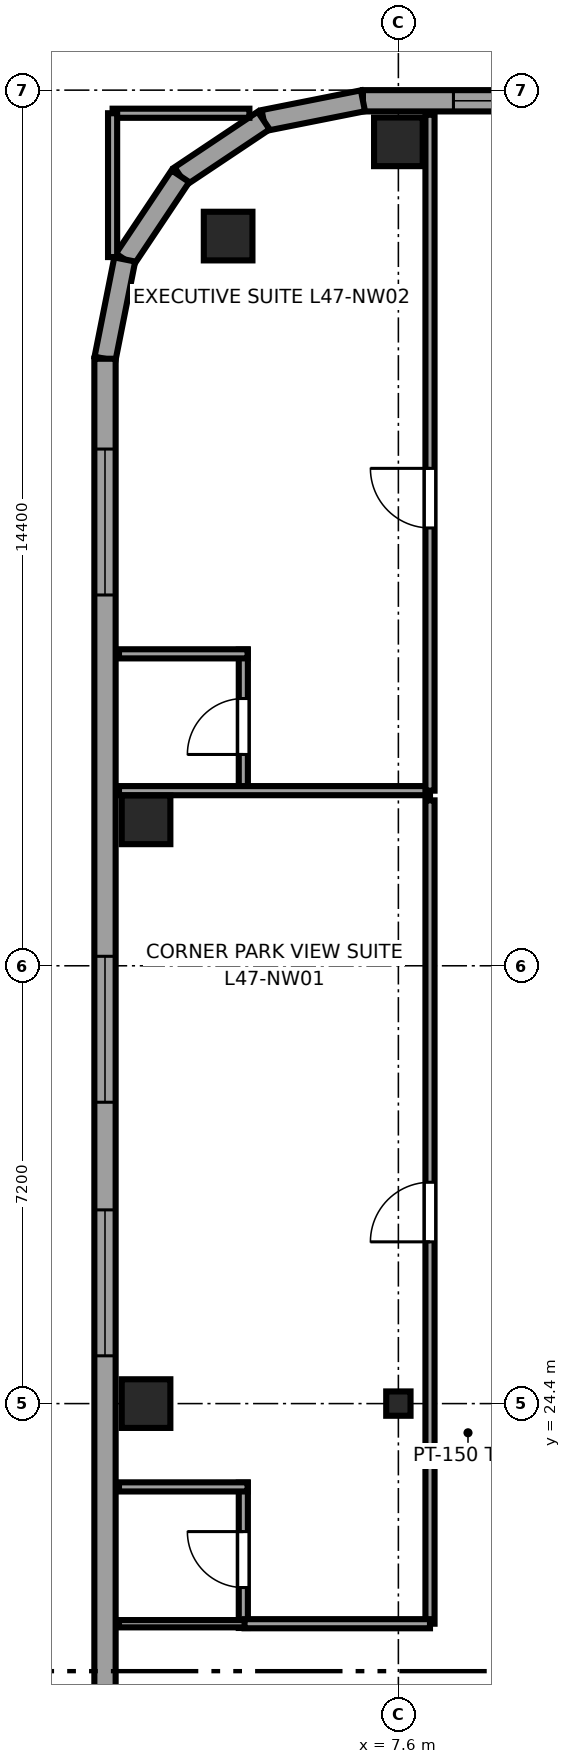
"""IFC4 building model, lengths in metres.
Left out: names, types, materials, properties, quantities, classifications, styles, units other than length and angle.
Written with IfcOpenShell. Run it as: python <this file> out.ifc"""

import sys

from ifc_helpers import new_model, si_unit, direction, frame, frame_2d, origin, origin_2d, place, context, subcontext, project, spatial, rectangle, i_section, extrude, source, transform, mapped, element, fill, save


model = new_model("IFC4")
c1 = context("Model", 3, precision=1e-05, world=origin(), true_north=direction((0.0, 1.0)))
c2 = subcontext(c1, "Body", "Model", "MODEL_VIEW")
j1 = project(units=[si_unit("LENGTHUNIT", "METRE"), si_unit("PLANEANGLEUNIT", "RADIAN")], contexts=[c1])
p1 = place(None, origin())
s1 = spatial("IfcSite", under=j1, at=p1, CompositionType="ELEMENT")
p2 = place(p1, origin())
s2 = spatial("IfcBuilding", under=s1, at=p2, CompositionType="ELEMENT")
p3 = place(p2, frame((0.0, 0.0, 179.0)))
s3 = spatial("IfcBuildingStorey", under=s2, at=p3, CompositionType="ELEMENT", Elevation=179.0)
m1 = source(origin(), c2, "Body", "SweptSolid", [
    extrude(rectangle(XDim=0.8, YDim=0.8, at=origin_2d()), origin(), (0.0, 0.0, 1.0), 3.55),
])
p4 = place(p3, frame((3.45, 24.4, 0.0), z_axis=(0.0, 0.0, 1.0), x_axis=(1.0, 0.0, 0.0)))
e1 = element("IfcColumn", 1, at=p4, inside=s3, PredefinedType="COLUMN", context=c2, shape_type="MappedRepresentation", body=[
    mapped(m1, transform((0.0, 0.0, 0.0), x_axis=(1.0, 0.0, 0.0), y_axis=(0.0, 1.0, 0.0), z_axis=(0.0, 0.0, 1.0), scale=1.0)),
])
m2 = source(origin(), c2, "Body", "SweptSolid", [
    extrude(i_section(OverallWidth=0.4, OverallDepth=0.4, WebThickness=0.02, FlangeThickness=0.035, at=origin_2d()), origin(), (0.0, 0.0, 1.0), 3.55),
])
p5 = place(p3, frame((7.6, 24.4, 0.0), z_axis=(0.0, 0.0, 1.0), x_axis=(1.0, 0.0, 0.0)))
e2 = element("IfcColumn", 2, at=p5, inside=s3, PredefinedType="COLUMN", context=c2, shape_type="MappedRepresentation", body=[
    mapped(m2, transform((0.0, 0.0, 0.0), x_axis=(1.0, 0.0, 0.0), y_axis=(0.0, 1.0, 0.0), z_axis=(0.0, 0.0, 1.0), scale=1.0)),
])
for number, where, z_axis, x_axis in (
    (3, (4.8, 43.6, 0.0), (0.0, 0.0, 1.0), (1.0, 0.0, 0.0)),
    (4, (7.6, 45.15, 0.0), (0.0, 0.0, 1.0), (1.0, 0.0, 0.0)),
    (5, (3.45, 34.0, 0.0), (0.0, 0.0, 1.0), (1.0, 0.0, 0.0)),
):
    element("IfcColumn", number, at=place(p3, frame(where, z_axis=z_axis, x_axis=x_axis)), inside=s3, PredefinedType="COLUMN", context=c2, shape_type="MappedRepresentation", body=[
        mapped(m1, transform((0.0, 0.0, 0.0), x_axis=(1.0, 0.0, 0.0), y_axis=(0.0, 1.0, 0.0), z_axis=(0.0, 0.0, 1.0), scale=1.0)),
    ])
p6 = place(p3, frame((49.983, 45.825, 0.0), z_axis=(0.0, 0.0, 1.0), x_axis=(-1.0, 0.0, 0.0)))
e6 = element("IfcWall", 6, at=p6, inside=s3, PredefinedType="SOLIDWALL", context=c2, shape_type="SweptSolid", body=[
    extrude(rectangle(XDim=42.966, YDim=0.35, at=frame_2d((21.483, 0.0))), origin(), (0.0, 0.0, 1.0), 3.25),
])
p7 = place(p6, frame((1.488, 0.0, 0.68)))
e7 = element("IfcOpeningElement", 7, at=p7, cuts=e6, PredefinedType="OPENING", context=c2, shape_type="SweptSolid", body=[
    extrude(rectangle(XDim=2.4, YDim=1.9, at=frame_2d((1.2, 0.95))), frame((0.0, 0.185, 0.0), z_axis=(0.0, -1.0, 0.0), x_axis=(1.0, 0.0, 0.0)), (0.0, 0.0, 1.0), 0.37),
])
p8 = place(p6, frame((9.841, 0.0, 0.68)))
e8 = element("IfcOpeningElement", 8, at=p8, cuts=e6, PredefinedType="OPENING", context=c2, shape_type="SweptSolid", body=[
    extrude(rectangle(XDim=2.4, YDim=1.9, at=frame_2d((1.2, 0.95))), frame((0.0, 0.185, 0.0), z_axis=(0.0, -1.0, 0.0), x_axis=(1.0, 0.0, 0.0)), (0.0, 0.0, 1.0), 0.37),
])
p9 = place(p6, frame((14.018, 0.0, 0.68)))
e9 = element("IfcOpeningElement", 9, at=p9, cuts=e6, PredefinedType="OPENING", context=c2, shape_type="SweptSolid", body=[
    extrude(rectangle(XDim=2.4, YDim=1.9, at=frame_2d((1.2, 0.95))), frame((0.0, 0.185, 0.0), z_axis=(0.0, -1.0, 0.0), x_axis=(1.0, 0.0, 0.0)), (0.0, 0.0, 1.0), 0.37),
])
p10 = place(p6, frame((18.195, 0.0, 0.68)))
e10 = element("IfcOpeningElement", 10, at=p10, cuts=e6, PredefinedType="OPENING", context=c2, shape_type="SweptSolid", body=[
    extrude(rectangle(XDim=2.4, YDim=1.9, at=frame_2d((1.2, 0.95))), frame((0.0, 0.185, 0.0), z_axis=(0.0, -1.0, 0.0), x_axis=(1.0, 0.0, 0.0)), (0.0, 0.0, 1.0), 0.37),
])
p11 = place(p6, frame((22.371, 0.0, 0.68)))
e11 = element("IfcOpeningElement", 11, at=p11, cuts=e6, PredefinedType="OPENING", context=c2, shape_type="SweptSolid", body=[
    extrude(rectangle(XDim=2.4, YDim=1.9, at=frame_2d((1.2, 0.95))), frame((0.0, 0.185, 0.0), z_axis=(0.0, -1.0, 0.0), x_axis=(1.0, 0.0, 0.0)), (0.0, 0.0, 1.0), 0.37),
])
p12 = place(p6, frame((26.548, 0.0, 0.68)))
e12 = element("IfcOpeningElement", 12, at=p12, cuts=e6, PredefinedType="OPENING", context=c2, shape_type="SweptSolid", body=[
    extrude(rectangle(XDim=2.4, YDim=1.9, at=frame_2d((1.2, 0.95))), frame((0.0, 0.185, 0.0), z_axis=(0.0, -1.0, 0.0), x_axis=(1.0, 0.0, 0.0)), (0.0, 0.0, 1.0), 0.37),
])
p13 = place(p6, frame((30.724, 0.0, 0.68)))
e13 = element("IfcOpeningElement", 13, at=p13, cuts=e6, PredefinedType="OPENING", context=c2, shape_type="SweptSolid", body=[
    extrude(rectangle(XDim=2.4, YDim=1.9, at=frame_2d((1.2, 0.95))), frame((0.0, 0.185, 0.0), z_axis=(0.0, -1.0, 0.0), x_axis=(1.0, 0.0, 0.0)), (0.0, 0.0, 1.0), 0.37),
])
p14 = place(p6, frame((34.901, 0.0, 0.68)))
e14 = element("IfcOpeningElement", 14, at=p14, cuts=e6, PredefinedType="OPENING", context=c2, shape_type="SweptSolid", body=[
    extrude(rectangle(XDim=2.4, YDim=1.9, at=frame_2d((1.2, 0.95))), frame((0.0, 0.185, 0.0), z_axis=(0.0, -1.0, 0.0), x_axis=(1.0, 0.0, 0.0)), (0.0, 0.0, 1.0), 0.37),
])
p15 = place(p6, frame((39.077, 0.0, 0.68)))
e15 = element("IfcOpeningElement", 15, at=p15, cuts=e6, PredefinedType="OPENING", context=c2, shape_type="SweptSolid", body=[
    extrude(rectangle(XDim=2.4, YDim=1.9, at=frame_2d((1.2, 0.95))), frame((0.0, 0.185, 0.0), z_axis=(0.0, -1.0, 0.0), x_axis=(1.0, 0.0, 0.0)), (0.0, 0.0, 1.0), 0.37),
])
p16 = place(p3, frame((7.017, 45.825, 0.0), z_axis=(0.0, 0.0, 1.0), x_axis=(-0.980788844421, -0.195072403631, 0.0)))
e16 = element("IfcWall", 16, at=p16, inside=s3, PredefinedType="SOLIDWALL", context=c2, shape_type="SweptSolid", body=[
    extrude(rectangle(XDim=1.665, YDim=0.35, at=frame_2d((0.832, 0.0))), origin(), (0.0, 0.0, 1.0), 3.25),
])
for number, where, z_axis, x_axis in (
    (17, (5.385, 45.5, 0.0), (0.0, 0.0, 1.0), (-0.832, -0.556, 0.0)),
    (18, (4.015, 44.585, 0.0), (0.0, 0.0, 1.0), (-0.556, -0.831, 0.0)),
):
    element("IfcWall", number, at=place(p3, frame(where, z_axis=z_axis, x_axis=x_axis)), inside=s3, PredefinedType="SOLIDWALL", context=c2, shape_type="SweptSolid", body=[
        extrude(rectangle(XDim=1.647, YDim=0.35, at=frame_2d((0.824, 0.0))), origin(), (0.0, 0.0, 1.0), 2.712),
    ])
p17 = place(p3, frame((3.1, 43.216, 0.0), z_axis=(0.0, 0.0, 1.0), x_axis=(-0.195044345786, -0.980794424524, 0.0)))
e19 = element("IfcWall", 19, at=p17, inside=s3, PredefinedType="SOLIDWALL", context=c2, shape_type="SweptSolid", body=[
    extrude(rectangle(XDim=1.665, YDim=0.35, at=frame_2d((0.833, 0.0))), origin(), (0.0, 0.0, 1.0), 3.25),
])
p18 = place(p3, frame((2.775, 41.583, 0.0), z_axis=(0.0, 0.0, 1.0), x_axis=(0.0, -1.0, 0.0)))
e20 = element("IfcWall", 20, at=p18, inside=s3, PredefinedType="SOLIDWALL", context=c2, shape_type="SweptSolid", body=[
    extrude(rectangle(XDim=34.566, YDim=0.35, at=frame_2d((17.283, 0.0))), origin(), (0.0, 0.0, 1.0), 3.25),
])
p19 = place(p18, frame((1.485, 0.0, 0.68)))
e21 = element("IfcOpeningElement", 21, at=p19, cuts=e20, PredefinedType="OPENING", context=c2, shape_type="SweptSolid", body=[
    extrude(rectangle(XDim=2.4, YDim=1.9, at=frame_2d((1.2, 0.95))), frame((0.0, 0.185, 0.0), z_axis=(0.0, -1.0, 0.0), x_axis=(1.0, 0.0, 0.0)), (0.0, 0.0, 1.0), 0.37),
])
p20 = place(p18, frame((9.827, 0.0, 0.68)))
e22 = element("IfcOpeningElement", 22, at=p20, cuts=e20, PredefinedType="OPENING", context=c2, shape_type="SweptSolid", body=[
    extrude(rectangle(XDim=2.4, YDim=1.9, at=frame_2d((1.2, 0.95))), frame((0.0, 0.185, 0.0), z_axis=(0.0, -1.0, 0.0), x_axis=(1.0, 0.0, 0.0)), (0.0, 0.0, 1.0), 0.37),
])
p21 = place(p18, frame((13.997, 0.0, 0.68)))
e23 = element("IfcOpeningElement", 23, at=p21, cuts=e20, PredefinedType="OPENING", context=c2, shape_type="SweptSolid", body=[
    extrude(rectangle(XDim=2.4, YDim=1.9, at=frame_2d((1.2, 0.95))), frame((0.0, 0.185, 0.0), z_axis=(0.0, -1.0, 0.0), x_axis=(1.0, 0.0, 0.0)), (0.0, 0.0, 1.0), 0.37),
])
p22 = place(p18, frame((30.13, 0.0, 0.68)))
e24 = element("IfcOpeningElement", 24, at=p22, cuts=e20, PredefinedType="OPENING", context=c2, shape_type="SweptSolid", body=[
    extrude(rectangle(XDim=2.4, YDim=1.9, at=frame_2d((1.2, 0.95))), frame((0.0, 0.185, 0.0), z_axis=(0.0, -1.0, 0.0), x_axis=(1.0, 0.0, 0.0)), (0.0, 0.0, 1.0), 0.37),
])
p23 = place(p18, frame((24.983, 0.0, 0.62)))
e25 = element("IfcOpeningElement", 25, at=p23, cuts=e20, PredefinedType="OPENING", context=c2, shape_type="SweptSolid", body=[
    extrude(rectangle(XDim=1.5, YDim=1.55, at=frame_2d((0.75, 0.775))), frame((0.0, 0.185, 0.0), z_axis=(0.0, -1.0, 0.0), x_axis=(1.0, 0.0, 0.0)), (0.0, 0.0, 1.0), 0.37),
])
p24 = place(p3, frame((5.05, 20.71, 0.0), z_axis=(0.0, 0.0, 1.0), x_axis=(0.0, 1.0, 0.0)))
e26 = element("IfcWall", 26, at=p24, inside=s3, PredefinedType="PARTITIONING", context=c2, shape_type="SweptSolid", body=[
    extrude(rectangle(XDim=2.39, YDim=0.15, at=frame_2d((1.195, 0.0))), origin(), (0.0, 0.0, 1.0), 3.25),
])
p25 = place(p24, frame((0.665, 0.0, 0.0)))
e27 = element("IfcOpeningElement", 27, at=p25, cuts=e26, PredefinedType="OPENING", context=c2, shape_type="SweptSolid", body=[
    extrude(rectangle(XDim=0.92, YDim=2.01, at=frame_2d((0.46, 1.005))), frame((0.0, 0.085, 0.0), z_axis=(0.0, -1.0, 0.0), x_axis=(1.0, 0.0, 0.0)), (0.0, 0.0, 1.0), 0.17),
])
p26 = place(p3, frame((3.005, 20.78, 0.0), z_axis=(0.0, 0.0, 1.0), x_axis=(1.0, 0.0, 0.0)))
e28 = element("IfcWall", 28, at=p26, inside=s3, PredefinedType="PLUMBINGWALL", context=c2, shape_type="SweptSolid", body=[
    extrude(rectangle(XDim=2.115, YDim=0.12, at=frame_2d((1.058, 0.0))), origin(), (0.0, 0.0, 1.0), 3.25),
])
p27 = place(p3, frame((3.005, 23.03, 0.0), z_axis=(0.0, 0.0, 1.0), x_axis=(1.0, 0.0, 0.0)))
e29 = element("IfcWall", 29, at=p27, inside=s3, PredefinedType="PARTITIONING", context=c2, shape_type="SweptSolid", body=[
    extrude(rectangle(XDim=2.115, YDim=0.15, at=frame_2d((1.058, 0.0))), origin(), (0.0, 0.0, 1.0), 3.25),
])
p28 = place(p3, frame((5.05, 34.41, 0.0), z_axis=(0.0, 0.0, 1.0), x_axis=(0.0, 1.0, 0.0)))
e30 = element("IfcWall", 30, at=p28, inside=s3, PredefinedType="PARTITIONING", context=c2, shape_type="SweptSolid", body=[
    extrude(rectangle(XDim=2.39, YDim=0.15, at=frame_2d((1.195, 0.0))), origin(), (0.0, 0.0, 1.0), 3.25),
])
p29 = place(p28, frame((0.665, 0.0, 0.0)))
e31 = element("IfcOpeningElement", 31, at=p29, cuts=e30, PredefinedType="OPENING", context=c2, shape_type="SweptSolid", body=[
    extrude(rectangle(XDim=0.92, YDim=2.01, at=frame_2d((0.46, 1.005))), frame((0.0, 0.085, 0.0), z_axis=(0.0, -1.0, 0.0), x_axis=(1.0, 0.0, 0.0)), (0.0, 0.0, 1.0), 0.17),
])
p30 = place(p3, frame((3.005, 34.48, 0.0), z_axis=(0.0, 0.0, 1.0), x_axis=(1.0, 0.0, 0.0)))
e32 = element("IfcWall", 32, at=p30, inside=s3, PredefinedType="PARTITIONING", context=c2, shape_type="SweptSolid", body=[
    extrude(rectangle(XDim=5.115, YDim=0.15, at=frame_2d((2.558, 0.0))), origin(), (0.0, 0.0, 1.0), 3.25),
])
p31 = place(p3, frame((3.005, 36.73, 0.0), z_axis=(0.0, 0.0, 1.0), x_axis=(1.0, 0.0, 0.0)))
e33 = element("IfcWall", 33, at=p31, inside=s3, PredefinedType="PARTITIONING", context=c2, shape_type="SweptSolid", body=[
    extrude(rectangle(XDim=2.115, YDim=0.15, at=frame_2d((1.058, 0.0))), origin(), (0.0, 0.0, 1.0), 3.25),
])
p32 = place(p3, frame((8.12, 20.78, 0.0), z_axis=(0.0, 0.0, 1.0), x_axis=(0.0, 1.0, 0.0)))
e34 = element("IfcWall", 34, at=p32, inside=s3, PredefinedType="PARTITIONING", context=c2, shape_type="SweptSolid", body=[
    extrude(rectangle(XDim=13.54, YDim=0.15, at=frame_2d((6.77, 0.0))), origin(), (0.0, 0.0, 1.0), 3.25),
])
p33 = place(p32, frame((6.28, 0.0, 0.0)))
e35 = element("IfcOpeningElement", 35, at=p33, cuts=e34, PredefinedType="OPENING", context=c2, shape_type="SweptSolid", body=[
    extrude(rectangle(XDim=0.98, YDim=2.12, at=frame_2d((0.49, 1.06))), frame((0.0, 0.085, 0.0), z_axis=(0.0, -1.0, 0.0), x_axis=(1.0, 0.0, 0.0)), (0.0, 0.0, 1.0), 0.17),
])
p34 = place(p3, frame((5.07, 20.78, 0.0), z_axis=(0.0, 0.0, 1.0), x_axis=(1.0, 0.0, 0.0)))
e36 = element("IfcWall", 36, at=p34, inside=s3, PredefinedType="PARTITIONING", context=c2, shape_type="SweptSolid", body=[
    extrude(rectangle(XDim=3.05, YDim=0.15, at=frame_2d((1.525, 0.0))), origin(), (0.0, 0.0, 1.0), 3.25),
])
p35 = place(p3, frame((8.12, 34.48, 0.0), z_axis=(0.0, 0.0, 1.0), x_axis=(0.0, 1.0, 0.0)))
e37 = element("IfcWall", 37, at=p35, inside=s3, PredefinedType="PARTITIONING", context=c2, shape_type="SweptSolid", body=[
    extrude(rectangle(XDim=11.115, YDim=0.15, at=frame_2d((5.558, 0.0))), origin(), (0.0, 0.0, 1.0), 3.25),
])
p36 = place(p35, frame((4.32, 0.0, 0.0)))
e38 = element("IfcOpeningElement", 38, at=p36, cuts=e37, PredefinedType="OPENING", context=c2, shape_type="SweptSolid", body=[
    extrude(rectangle(XDim=0.98, YDim=2.12, at=frame_2d((0.49, 1.06))), frame((0.0, 0.085, 0.0), z_axis=(0.0, -1.0, 0.0), x_axis=(1.0, 0.0, 0.0)), (0.0, 0.0, 1.0), 0.17),
])
p37 = place(p3, frame((2.9, 45.62, 0.0), z_axis=(0.0, 0.0, 1.0), x_axis=(1.0, 0.0, 0.0)))
e39 = element("IfcWall", 39, at=p37, inside=s3, PredefinedType="PARTITIONING", context=c2, shape_type="SweptSolid", body=[
    extrude(rectangle(XDim=2.25, YDim=0.15, at=frame_2d((1.125, 0.0))), origin(), (0.0, 0.0, 1.0), 3.25),
])
p38 = place(p3, frame((2.9, 43.255, 0.0), z_axis=(0.0, 0.0, 1.0), x_axis=(0.0, 1.0, 0.0)))
e40 = element("IfcWall", 40, at=p38, inside=s3, PredefinedType="PARTITIONING", context=c2, shape_type="SweptSolid", body=[
    extrude(rectangle(XDim=2.365, YDim=0.15, at=frame_2d((1.183, 0.0))), origin(), (0.0, 0.0, 1.0), 3.25),
])
m3 = source(origin(), c2, "Body", "SweptSolid", [
    extrude(rectangle(XDim=2.4, YDim=1.9, at=frame_2d((1.2, 0.95))), frame((0.0, 0.09, 0.0), z_axis=(0.0, -1.0, 0.0), x_axis=(1.0, 0.0, 0.0)), (0.0, 0.0, 1.0), 0.06),
])
p39 = place(p15, origin())
e41 = element("IfcWindow", 41, at=p39, inside=s3, PartitioningType="TRIPLE_PANEL_HORIZONTAL", PredefinedType="WINDOW", context=c2, shape_type="MappedRepresentation", body=[
    mapped(m3, transform((0.0, 0.0, 0.0), x_axis=(1.0, 0.0, 0.0), y_axis=(0.0, 1.0, 0.0), z_axis=(0.0, 0.0, 1.0), scale=1.0)),
])
fill(e15, e41)
p40 = place(p19, origin())
e42 = element("IfcWindow", 42, at=p40, inside=s3, PartitioningType="TRIPLE_PANEL_HORIZONTAL", PredefinedType="WINDOW", context=c2, shape_type="MappedRepresentation", body=[
    mapped(m3, transform((0.0, 0.0, 0.0), x_axis=(1.0, 0.0, 0.0), y_axis=(0.0, 1.0, 0.0), z_axis=(0.0, 0.0, 1.0), scale=1.0)),
])
fill(e21, e42)
p41 = place(p20, origin())
e43 = element("IfcWindow", 43, at=p41, inside=s3, PartitioningType="TRIPLE_PANEL_HORIZONTAL", PredefinedType="WINDOW", context=c2, shape_type="MappedRepresentation", body=[
    mapped(m3, transform((0.0, 0.0, 0.0), x_axis=(1.0, 0.0, 0.0), y_axis=(0.0, 1.0, 0.0), z_axis=(0.0, 0.0, 1.0), scale=1.0)),
])
fill(e22, e43)
p42 = place(p21, origin())
e44 = element("IfcWindow", 44, at=p42, inside=s3, PartitioningType="TRIPLE_PANEL_HORIZONTAL", PredefinedType="WINDOW", context=c2, shape_type="MappedRepresentation", body=[
    mapped(m3, transform((0.0, 0.0, 0.0), x_axis=(1.0, 0.0, 0.0), y_axis=(0.0, 1.0, 0.0), z_axis=(0.0, 0.0, 1.0), scale=1.0)),
])
fill(e23, e44)
m4 = source(origin(), c2, "Body", "SweptSolid", [
    extrude(rectangle(XDim=0.92, YDim=2.01, at=frame_2d((0.46, 1.005))), frame((0.0, 0.025, 0.0), z_axis=(0.0, -1.0, 0.0), x_axis=(1.0, 0.0, 0.0)), (0.0, 0.0, 1.0), 0.05),
])
p43 = place(p25, origin())
e45 = element("IfcDoor", 45, at=p43, inside=s3, OperationType="SINGLE_SWING_RIGHT", PredefinedType="DOOR", context=c2, shape_type="MappedRepresentation", body=[
    mapped(m4, transform((0.0, 0.0, 0.0), x_axis=(1.0, 0.0, 0.0), y_axis=(0.0, 1.0, 0.0), z_axis=(0.0, 0.0, 1.0), scale=1.0)),
])
fill(e27, e45)
p44 = place(p29, origin())
e46 = element("IfcDoor", 46, at=p44, inside=s3, OperationType="SINGLE_SWING_LEFT", PredefinedType="DOOR", context=c2, shape_type="MappedRepresentation", body=[
    mapped(m4, transform((0.0, 0.0, 0.0), x_axis=(1.0, 0.0, 0.0), y_axis=(0.0, 1.0, 0.0), z_axis=(0.0, 0.0, 1.0), scale=1.0)),
])
fill(e31, e46)
m5 = source(origin(), c2, "Body", "SweptSolid", [
    extrude(rectangle(XDim=0.98, YDim=2.12, at=frame_2d((0.49, 1.06))), frame((0.0, 0.025, 0.0), z_axis=(0.0, -1.0, 0.0), x_axis=(1.0, 0.0, 0.0)), (0.0, 0.0, 1.0), 0.05),
])
p45 = place(p33, origin())
e47 = element("IfcDoor", 47, at=p45, inside=s3, OperationType="SINGLE_SWING_LEFT", PredefinedType="DOOR", context=c2, shape_type="MappedRepresentation", body=[
    mapped(m5, transform((0.0, 0.0, 0.0), x_axis=(1.0, 0.0, 0.0), y_axis=(0.0, 1.0, 0.0), z_axis=(0.0, 0.0, 1.0), scale=1.0)),
])
fill(e35, e47)
p46 = place(p36, origin())
e48 = element("IfcDoor", 48, at=p46, inside=s3, OperationType="SINGLE_SWING_RIGHT", PredefinedType="DOOR", context=c2, shape_type="MappedRepresentation", body=[
    mapped(m5, transform((0.0, 0.0, 0.0), x_axis=(1.0, 0.0, 0.0), y_axis=(0.0, 1.0, 0.0), z_axis=(0.0, 0.0, 1.0), scale=1.0)),
])
fill(e38, e48)
save(model, sys.argv[1])
